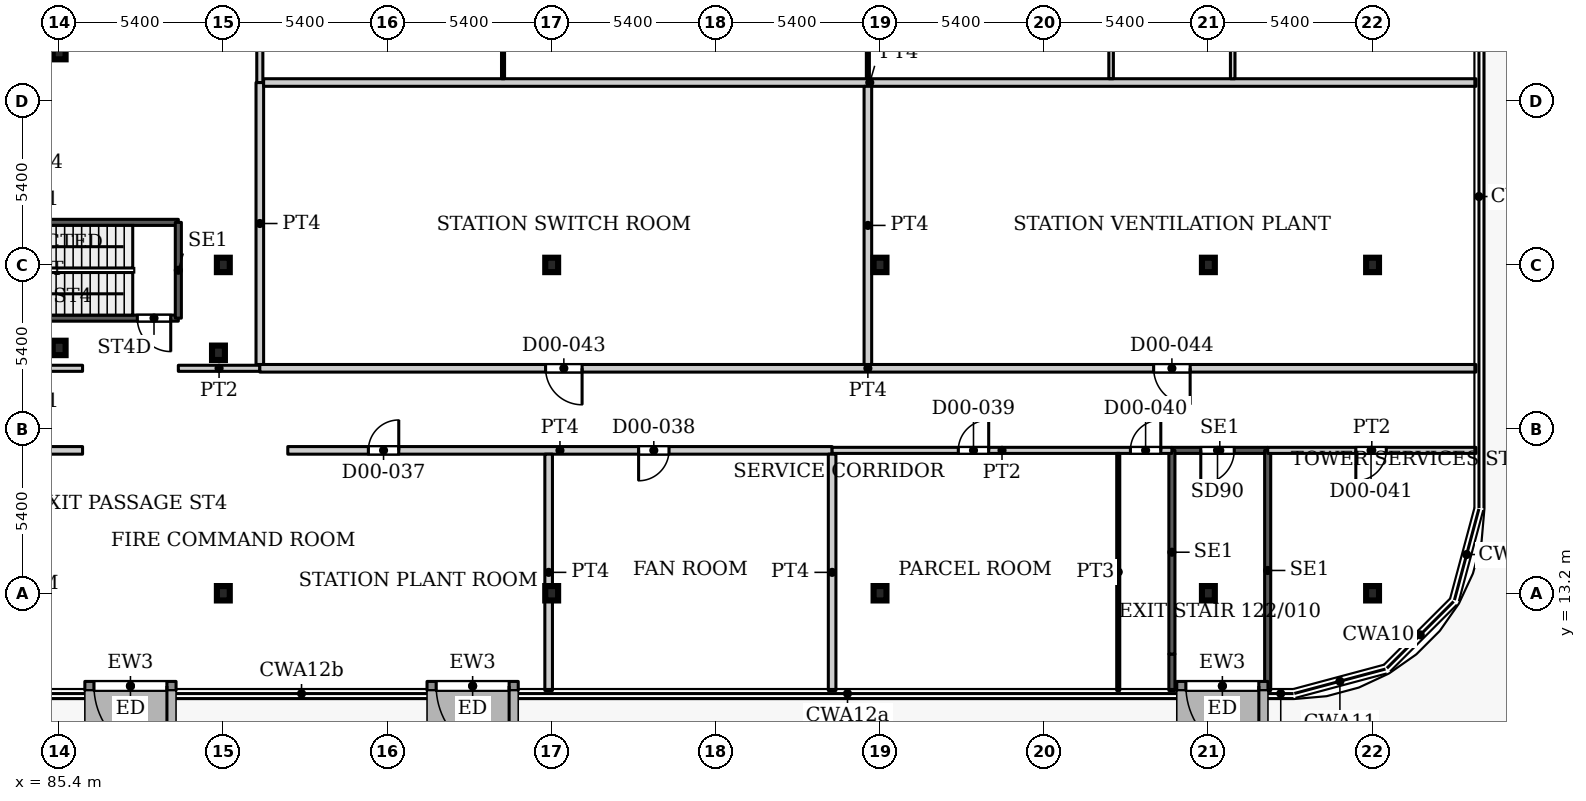
"""IFC4 building model, lengths in metres.
Left out: names, types, materials, properties, quantities, classifications, styles, units other than length and angle.
Written with IfcOpenShell. Run it as: python <this file> out.ifc"""

import sys

from ifc_helpers import new_model, si_unit, direction, frame, frame_2d, origin, origin_2d, place, context, subcontext, project, spatial, rectangle, i_section, extrude, source, transform, mapped, element, fill, save


model = new_model("IFC4")
c1 = context("Model", 3, precision=1e-05, world=origin(), true_north=direction((0.0, 1.0)))
c2 = subcontext(c1, "Body", "Model", "MODEL_VIEW")
j1 = project(units=[si_unit("LENGTHUNIT", "METRE"), si_unit("PLANEANGLEUNIT", "RADIAN")], contexts=[c1])
p1 = place(None, origin())
s1 = spatial("IfcSite", under=j1, at=p1, CompositionType="ELEMENT")
p2 = place(p1, origin())
s2 = spatial("IfcBuilding", under=s1, at=p2, CompositionType="ELEMENT")
p3 = place(p2, origin())
s3 = spatial("IfcBuildingStorey", under=s2, at=p3, CompositionType="ELEMENT", Elevation=0.0)
for number, where, z_axis, x_axis in (
    (1, (90.8, 13.2, 0.0), (0.0, 0.0, 1.0), (1.0, 0.0, 0.0)),
    (2, (101.6, 13.2, 0.0), (0.0, 0.0, 1.0), (1.0, 0.0, 0.0)),
    (3, (112.4, 13.2, 0.0), (0.0, 0.0, 1.0), (1.0, 0.0, 0.0)),
    (4, (123.2, 13.2, 0.0), (0.0, 0.0, 1.0), (1.0, 0.0, 0.0)),
    (5, (128.6, 13.2, 0.0), (0.0, 0.0, 1.0), (1.0, 0.0, 0.0)),
    (6, (90.8, 24.0, 0.0), (0.0, 0.0, 1.0), (1.0, 0.0, 0.0)),
    (7, (101.6, 24.0, 0.0), (0.0, 0.0, 1.0), (1.0, 0.0, 0.0)),
    (8, (112.4, 24.0, 0.0), (0.0, 0.0, 1.0), (1.0, 0.0, 0.0)),
    (9, (123.2, 24.0, 0.0), (0.0, 0.0, 1.0), (1.0, 0.0, 0.0)),
    (10, (128.6, 24.0, 0.0), (0.0, 0.0, 1.0), (1.0, 0.0, 0.0)),
    (11, (90.64, 21.11, 0.0), (0.0, 0.0, 1.0), (1.0, 0.0, 0.0)),
    (12, (85.4, 21.27, 0.0), (0.0, 0.0, 1.0), (1.0, 0.0, 0.0)),
    (13, (85.4, 31.0, 0.0), (0.0, 0.0, 1.0), (1.0, 0.0, 0.0)),
):
    element("IfcColumn", number, at=place(p3, frame(where, z_axis=z_axis, x_axis=x_axis)), inside=s3, PredefinedType="COLUMN", context=c2, shape_type="SweptSolid", body=[
        extrude(i_section(OverallWidth=0.424, OverallDepth=0.474, WebThickness=0.048, FlangeThickness=0.077, FilletRadius=0.014, at=origin_2d()), origin(), (0.0, 0.0, 1.0), 7.5),
    ])
p4 = place(p3, frame((125.16, 10.15, 0.0), z_axis=(0.0, 0.0, 1.0), x_axis=(-1.0, 0.0, 0.0)))
e14 = element("IfcWall", 14, at=p4, inside=s3, PredefinedType="SOLIDWALL", context=c2, shape_type="SweptSolid", body=[
    extrude(rectangle(XDim=3.0, YDim=0.3, at=frame_2d((1.5, 0.0))), origin(), (0.0, 0.0, 1.0), 7.25),
])
p5 = place(p4, frame((0.3, 0.0, 0.0)))
e15 = element("IfcOpeningElement", 15, at=p5, cuts=e14, PredefinedType="OPENING", context=c2, shape_type="SweptSolid", body=[
    extrude(rectangle(XDim=2.4, YDim=2.7, at=frame_2d((1.2, 1.35))), frame((0.0, 0.16, 0.0), z_axis=(0.0, -1.0, 0.0), x_axis=(1.0, 0.0, 0.0)), (0.0, 0.0, 1.0), 0.32),
])
p6 = place(p3, frame((100.5, 10.15, 0.0), z_axis=(0.0, 0.0, 1.0), x_axis=(-1.0, 0.0, 0.0)))
e16 = element("IfcWall", 16, at=p6, inside=s3, PredefinedType="SOLIDWALL", context=c2, shape_type="SweptSolid", body=[
    extrude(rectangle(XDim=3.0, YDim=0.3, at=frame_2d((1.5, 0.0))), origin(), (0.0, 0.0, 1.0), 7.25),
])
p7 = place(p6, frame((0.3, 0.0, 0.0)))
e17 = element("IfcOpeningElement", 17, at=p7, cuts=e16, PredefinedType="OPENING", context=c2, shape_type="SweptSolid", body=[
    extrude(rectangle(XDim=2.4, YDim=2.7, at=frame_2d((1.2, 1.35))), frame((0.0, 0.16, 0.0), z_axis=(0.0, -1.0, 0.0), x_axis=(1.0, 0.0, 0.0)), (0.0, 0.0, 1.0), 0.32),
])
p8 = place(p3, frame((89.245, 10.15, 0.0), z_axis=(0.0, 0.0, 1.0), x_axis=(-1.0, 0.0, 0.0)))
e18 = element("IfcWall", 18, at=p8, inside=s3, PredefinedType="SOLIDWALL", context=c2, shape_type="SweptSolid", body=[
    extrude(rectangle(XDim=3.0, YDim=0.3, at=frame_2d((1.5, 0.0))), origin(), (0.0, 0.0, 1.0), 7.25),
])
p9 = place(p8, frame((0.3, 0.0, 0.0)))
e19 = element("IfcOpeningElement", 19, at=p9, cuts=e18, PredefinedType="OPENING", context=c2, shape_type="SweptSolid", body=[
    extrude(rectangle(XDim=2.4, YDim=2.7, at=frame_2d((1.2, 1.35))), frame((0.0, 0.16, 0.0), z_axis=(0.0, -1.0, 0.0), x_axis=(1.0, 0.0, 0.0)), (0.0, 0.0, 1.0), 0.32),
])
p10 = place(p3, frame((80.16, 22.25, 0.0), z_axis=(0.0, 0.0, 1.0), x_axis=(1.0, 0.0, 0.0)))
e20 = element("IfcWall", 20, at=p10, inside=s3, PredefinedType="SHEAR", context=c2, shape_type="SweptSolid", body=[
    extrude(rectangle(XDim=9.16, YDim=0.2, at=frame_2d((4.58, 0.0))), origin(), (0.0, 0.0, 1.0), 7.5),
])
p11 = place(p10, frame((7.81, 0.0, 0.0)))
e21 = element("IfcOpeningElement", 21, at=p11, cuts=e20, PredefinedType="OPENING", context=c2, shape_type="SweptSolid", body=[
    extrude(rectangle(XDim=1.1, YDim=2.2, at=frame_2d((0.55, 1.1))), frame((0.0, 0.11, 0.0), z_axis=(0.0, -1.0, 0.0), x_axis=(1.0, 0.0, 0.0)), (0.0, 0.0, 1.0), 0.22),
])
p12 = place(p3, frame((80.16, 25.4, 0.0), z_axis=(0.0, 0.0, 1.0), x_axis=(1.0, 0.0, 0.0)))
e22 = element("IfcWall", 22, at=p12, inside=s3, PredefinedType="SHEAR", context=c2, shape_type="SweptSolid", body=[
    extrude(rectangle(XDim=9.16, YDim=0.2, at=frame_2d((4.58, 0.0))), origin(), (0.0, 0.0, 1.0), 7.5),
])
p13 = place(p3, frame((89.32, 22.25, 0.0), z_axis=(0.0, 0.0, 1.0), x_axis=(0.0, 1.0, 0.0)))
e23 = element("IfcWall", 23, at=p13, inside=s3, PredefinedType="SHEAR", context=c2, shape_type="SweptSolid", body=[
    extrude(rectangle(XDim=3.15, YDim=0.2, at=frame_2d((1.575, 0.0))), origin(), (0.0, 0.0, 1.0), 7.5),
])
p14 = place(p3, frame((122.0, 17.9, 0.0), z_axis=(0.0, 0.0, 1.0), x_axis=(1.0, 0.0, 0.0)))
e24 = element("IfcWall", 24, at=p14, inside=s3, PredefinedType="SHEAR", context=c2, shape_type="SweptSolid", body=[
    extrude(rectangle(XDim=3.15, YDim=0.2, at=frame_2d((1.575, 0.0))), origin(), (0.0, 0.0, 1.0), 7.5),
])
p15 = place(p14, frame((0.95, 0.0, 0.0)))
e25 = element("IfcOpeningElement", 25, at=p15, cuts=e24, PredefinedType="OPENING", context=c2, shape_type="SweptSolid", body=[
    extrude(rectangle(XDim=1.1, YDim=2.2, at=frame_2d((0.55, 1.1))), frame((0.0, 0.11, 0.0), z_axis=(0.0, -1.0, 0.0), x_axis=(1.0, 0.0, 0.0)), (0.0, 0.0, 1.0), 0.22),
])
p16 = place(p3, frame((122.0, 10.0, 0.0), z_axis=(0.0, 0.0, 1.0), x_axis=(0.0, 1.0, 0.0)))
e26 = element("IfcWall", 26, at=p16, inside=s3, PredefinedType="SHEAR", context=c2, shape_type="SweptSolid", body=[
    extrude(rectangle(XDim=1.2, YDim=0.2, at=frame_2d((0.6, 0.0))), origin(), (0.0, 0.0, 1.0), 7.5),
])
p17 = place(p3, frame((122.0, 11.2, 0.0), z_axis=(0.0, 0.0, 1.0), x_axis=(0.0, 1.0, 0.0)))
e27 = element("IfcWall", 27, at=p17, inside=s3, PredefinedType="SHEAR", context=c2, shape_type="SweptSolid", body=[
    extrude(rectangle(XDim=6.7, YDim=0.2, at=frame_2d((3.35, 0.0))), origin(), (0.0, 0.0, 1.0), 7.5),
])
p18 = place(p3, frame((125.15, 10.0, 0.0), z_axis=(0.0, 0.0, 1.0), x_axis=(0.0, 1.0, 0.0)))
e28 = element("IfcWall", 28, at=p18, inside=s3, PredefinedType="SHEAR", context=c2, shape_type="SweptSolid", body=[
    extrude(rectangle(XDim=7.9, YDim=0.2, at=frame_2d((3.95, 0.0))), origin(), (0.0, 0.0, 1.0), 7.5),
])
p19 = place(p3, frame((79.91, 17.9, 0.0), z_axis=(0.0, 0.0, 1.0), x_axis=(1.0, 0.0, 0.0)))
e29 = element("IfcWall", 29, at=p19, inside=s3, PredefinedType="PARTITIONING", context=c2, shape_type="SweptSolid", body=[
    extrude(rectangle(XDim=6.26, YDim=0.25, at=frame_2d((3.13, 0.0))), origin(), (0.0, 0.0, 1.0), 7.08),
])
p20 = place(p19, frame((2.65, 0.0, 0.0)))
e30 = element("IfcOpeningElement", 30, at=p20, cuts=e29, PredefinedType="OPENING", context=c2, shape_type="SweptSolid", body=[
    extrude(rectangle(XDim=1.0, YDim=2.1, at=frame_2d((0.5, 1.05))), frame((0.0, 0.135, 0.0), z_axis=(0.0, -1.0, 0.0), x_axis=(1.0, 0.0, 0.0)), (0.0, 0.0, 1.0), 0.27),
])
p21 = place(p3, frame((79.91, 20.6, 0.0), z_axis=(0.0, 0.0, 1.0), x_axis=(1.0, 0.0, 0.0)))
e31 = element("IfcWall", 31, at=p21, inside=s3, PredefinedType="PARTITIONING", context=c2, shape_type="SweptSolid", body=[
    extrude(rectangle(XDim=6.26, YDim=0.2, at=frame_2d((3.13, 0.0))), origin(), (0.0, 0.0, 1.0), 7.08),
])
p22 = place(p3, frame((89.32, 20.6, 0.0), z_axis=(0.0, 0.0, 1.0), x_axis=(1.0, 0.0, 0.0)))
e32 = element("IfcWall", 32, at=p22, inside=s3, PredefinedType="PARTITIONING", context=c2, shape_type="SweptSolid", body=[
    extrude(rectangle(XDim=2.68, YDim=0.2, at=frame_2d((1.34, 0.0))), origin(), (0.0, 0.0, 1.0), 7.08),
])
p23 = place(p3, frame((92.0, 20.6, 0.0), z_axis=(0.0, 0.0, 1.0), x_axis=(1.0, 0.0, 0.0)))
e33 = element("IfcWall", 33, at=p23, inside=s3, PredefinedType="PARTITIONING", context=c2, shape_type="SweptSolid", body=[
    extrude(rectangle(XDim=40.0, YDim=0.25, at=frame_2d((20.0, 0.0))), origin(), (0.0, 0.0, 1.0), 7.08),
])
p24 = place(p23, frame((9.4, 0.0, 0.0)))
e34 = element("IfcOpeningElement", 34, at=p24, cuts=e33, PredefinedType="OPENING", context=c2, shape_type="SweptSolid", body=[
    extrude(rectangle(XDim=1.2, YDim=2.1, at=frame_2d((0.6, 1.05))), frame((0.0, 0.135, 0.0), z_axis=(0.0, -1.0, 0.0), x_axis=(1.0, 0.0, 0.0)), (0.0, 0.0, 1.0), 0.27),
])
p25 = place(p23, frame((29.4, 0.0, 0.0)))
e35 = element("IfcOpeningElement", 35, at=p25, cuts=e33, PredefinedType="OPENING", context=c2, shape_type="SweptSolid", body=[
    extrude(rectangle(XDim=1.2, YDim=2.1, at=frame_2d((0.6, 1.05))), frame((0.0, 0.135, 0.0), z_axis=(0.0, -1.0, 0.0), x_axis=(1.0, 0.0, 0.0)), (0.0, 0.0, 1.0), 0.27),
])
p26 = place(p3, frame((92.0, 20.725, 0.0), z_axis=(0.0, 0.0, 1.0), x_axis=(0.0, 1.0, 0.0)))
e36 = element("IfcWall", 36, at=p26, inside=s3, PredefinedType="PARTITIONING", context=c2, shape_type="SweptSolid", body=[
    extrude(rectangle(XDim=9.275, YDim=0.25, at=frame_2d((4.637, 0.0))), origin(), (0.0, 0.0, 1.0), 7.08),
])
p27 = place(p3, frame((92.0, 30.0, 0.0), z_axis=(0.0, 0.0, 1.0), x_axis=(0.0, 1.0, 0.0)))
e37 = element("IfcWall", 37, at=p27, inside=s3, PredefinedType="PARTITIONING", context=c2, shape_type="SweptSolid", body=[
    extrude(rectangle(XDim=11.9, YDim=0.2, at=frame_2d((5.95, 0.0))), origin(), (0.0, 0.0, 1.0), 7.08),
])
p28 = place(p3, frame((92.125, 30.0, 0.0), z_axis=(0.0, 0.0, 1.0), x_axis=(1.0, 0.0, 0.0)))
e38 = element("IfcWall", 38, at=p28, inside=s3, PredefinedType="PARTITIONING", context=c2, shape_type="SweptSolid", body=[
    extrude(rectangle(XDim=39.875, YDim=0.25, at=frame_2d((19.938, 0.0))), origin(), (0.0, 0.0, 1.0), 7.08),
])
p29 = place(p3, frame((92.92, 17.9, 0.0), z_axis=(0.0, 0.0, 1.0), x_axis=(1.0, 0.0, 0.0)))
e39 = element("IfcWall", 39, at=p29, inside=s3, PredefinedType="PARTITIONING", context=c2, shape_type="SweptSolid", body=[
    extrude(rectangle(XDim=17.904, YDim=0.25, at=frame_2d((8.952, 0.0))), origin(), (0.0, 0.0, 1.0), 7.08),
])
p30 = place(p29, frame((2.65, 0.0, 0.0)))
e40 = element("IfcOpeningElement", 40, at=p30, cuts=e39, PredefinedType="OPENING", context=c2, shape_type="SweptSolid", body=[
    extrude(rectangle(XDim=1.0, YDim=2.1, at=frame_2d((0.5, 1.05))), frame((0.0, 0.135, 0.0), z_axis=(0.0, -1.0, 0.0), x_axis=(1.0, 0.0, 0.0)), (0.0, 0.0, 1.0), 0.27),
])
p31 = place(p29, frame((11.539, 0.0, 0.0)))
e41 = element("IfcOpeningElement", 41, at=p31, cuts=e39, PredefinedType="OPENING", context=c2, shape_type="SweptSolid", body=[
    extrude(rectangle(XDim=1.0, YDim=2.1, at=frame_2d((0.5, 1.05))), frame((0.0, 0.135, 0.0), z_axis=(0.0, -1.0, 0.0), x_axis=(1.0, 0.0, 0.0)), (0.0, 0.0, 1.0), 0.27),
])
p32 = place(p3, frame((100.0, 30.125, 0.0), z_axis=(0.0, 0.0, 1.0), x_axis=(0.0, 1.0, 0.0)))
e42 = element("IfcWall", 42, at=p32, inside=s3, PredefinedType="PARTITIONING", context=c2, shape_type="SweptSolid", body=[
    extrude(rectangle(XDim=11.775, YDim=0.1, at=frame_2d((5.887, 0.0))), origin(), (0.0, 0.0, 1.0), 7.08),
])
for number, where, z_axis, x_axis in (
    (43, (101.5, 10.0, 0.0), (0.0, 0.0, 1.0), (0.0, 1.0, 0.0)),
    (44, (110.824, 10.0, 0.0), (0.0, 0.0, 1.0), (0.0, 1.0, 0.0)),
):
    element("IfcWall", number, at=place(p3, frame(where, z_axis=z_axis, x_axis=x_axis)), inside=s3, PredefinedType="PARTITIONING", context=c2, shape_type="SweptSolid", body=[
        extrude(rectangle(XDim=7.775, YDim=0.25, at=frame_2d((3.887, 0.0))), origin(), (0.0, 0.0, 1.0), 7.08),
    ])
p33 = place(p3, frame((110.824, 17.9, 0.0), z_axis=(0.0, 0.0, 1.0), x_axis=(1.0, 0.0, 0.0)))
e45 = element("IfcWall", 45, at=p33, inside=s3, PredefinedType="PARTITIONING", context=c2, shape_type="SweptSolid", body=[
    extrude(rectangle(XDim=11.176, YDim=0.2, at=frame_2d((5.588, 0.0))), origin(), (0.0, 0.0, 1.0), 7.08),
])
p34 = place(p33, frame((4.15, 0.0, 0.0)))
e46 = element("IfcOpeningElement", 46, at=p34, cuts=e45, PredefinedType="OPENING", context=c2, shape_type="SweptSolid", body=[
    extrude(rectangle(XDim=1.0, YDim=2.1, at=frame_2d((0.5, 1.05))), frame((0.0, 0.11, 0.0), z_axis=(0.0, -1.0, 0.0), x_axis=(1.0, 0.0, 0.0)), (0.0, 0.0, 1.0), 0.22),
])
p35 = place(p33, frame((9.811, 0.0, 0.0)))
e47 = element("IfcOpeningElement", 47, at=p35, cuts=e45, PredefinedType="OPENING", context=c2, shape_type="SweptSolid", body=[
    extrude(rectangle(XDim=1.0, YDim=2.1, at=frame_2d((0.5, 1.05))), frame((0.0, 0.11, 0.0), z_axis=(0.0, -1.0, 0.0), x_axis=(1.0, 0.0, 0.0)), (0.0, 0.0, 1.0), 0.22),
])
p36 = place(p3, frame((112.0, 20.725, 0.0), z_axis=(0.0, 0.0, 1.0), x_axis=(0.0, 1.0, 0.0)))
e48 = element("IfcWall", 48, at=p36, inside=s3, PredefinedType="PARTITIONING", context=c2, shape_type="SweptSolid", body=[
    extrude(rectangle(XDim=9.15, YDim=0.25, at=frame_2d((4.575, 0.0))), origin(), (0.0, 0.0, 1.0), 7.08),
])
p37 = place(p3, frame((112.0, 30.125, 0.0), z_axis=(0.0, 0.0, 1.0), x_axis=(0.0, 1.0, 0.0)))
e49 = element("IfcWall", 49, at=p37, inside=s3, PredefinedType="PARTITIONING", context=c2, shape_type="SweptSolid", body=[
    extrude(rectangle(XDim=11.875, YDim=0.1, at=frame_2d((5.938, 0.0))), origin(), (0.0, 0.0, 1.0), 7.08),
])
p38 = place(p3, frame((120.0, 30.125, 0.0), z_axis=(0.0, 0.0, 1.0), x_axis=(0.0, 1.0, 0.0)))
e50 = element("IfcWall", 50, at=p38, inside=s3, PredefinedType="PARTITIONING", context=c2, shape_type="SweptSolid", body=[
    extrude(rectangle(XDim=11.8, YDim=0.15, at=frame_2d((5.9, 0.0))), origin(), (0.0, 0.0, 1.0), 7.08),
])
p39 = place(p3, frame((120.235, 10.0, 0.0), z_axis=(0.0, 0.0, 1.0), x_axis=(0.0, 1.0, 0.0)))
e51 = element("IfcWall", 51, at=p39, inside=s3, PredefinedType="PARTITIONING", context=c2, shape_type="SweptSolid", body=[
    extrude(rectangle(XDim=7.8, YDim=0.1, at=frame_2d((3.9, 0.0))), origin(), (0.0, 0.0, 1.0), 7.08),
])
p40 = place(p3, frame((124.0, 30.125, 0.0), z_axis=(0.0, 0.0, 1.0), x_axis=(0.0, 1.0, 0.0)))
e52 = element("IfcWall", 52, at=p40, inside=s3, PredefinedType="PARTITIONING", context=c2, shape_type="SweptSolid", body=[
    extrude(rectangle(XDim=13.776, YDim=0.15, at=frame_2d((6.888, 0.0))), origin(), (0.0, 0.0, 1.0), 7.08),
])
p41 = place(p40, frame((12.275, 0.0, 0.0)))
e53 = element("IfcOpeningElement", 53, at=p41, cuts=e52, PredefinedType="OPENING", context=c2, shape_type="SweptSolid", body=[
    extrude(rectangle(XDim=1.0, YDim=2.1, at=frame_2d((0.5, 1.05))), frame((0.0, 0.085, 0.0), z_axis=(0.0, -1.0, 0.0), x_axis=(1.0, 0.0, 0.0)), (0.0, 0.0, 1.0), 0.17),
])
p42 = place(p3, frame((125.15, 17.9, 0.0), z_axis=(0.0, 0.0, 1.0), x_axis=(1.0, 0.0, 0.0)))
e54 = element("IfcWall", 54, at=p42, inside=s3, PredefinedType="PARTITIONING", context=c2, shape_type="SweptSolid", body=[
    extrude(rectangle(XDim=6.85, YDim=0.2, at=frame_2d((3.425, 0.0))), origin(), (0.0, 0.0, 1.0), 7.08),
])
p43 = place(p42, frame((2.9, 0.0, 0.0)))
e55 = element("IfcOpeningElement", 55, at=p43, cuts=e54, PredefinedType="OPENING", context=c2, shape_type="SweptSolid", body=[
    extrude(rectangle(XDim=1.0, YDim=2.1, at=frame_2d((0.5, 1.05))), frame((0.0, 0.11, 0.0), z_axis=(0.0, -1.0, 0.0), x_axis=(1.0, 0.0, 0.0)), (0.0, 0.0, 1.0), 0.22),
])
m1 = source(origin(), c2, "Body", "SweptSolid", [
    extrude(rectangle(XDim=2.4, YDim=2.7, at=frame_2d((1.2, 1.35))), frame((0.0, 0.025, 0.0), z_axis=(0.0, -1.0, 0.0), x_axis=(1.0, 0.0, 0.0)), (0.0, 0.0, 1.0), 0.05),
])
p44 = place(p5, origin())
e56 = element("IfcDoor", 56, at=p44, inside=s3, OperationType="DOUBLE_DOOR_SINGLE_SWING", PredefinedType="DOOR", context=c2, shape_type="MappedRepresentation", body=[
    mapped(m1, transform((0.0, 0.0, 0.0), x_axis=(1.0, 0.0, 0.0), y_axis=(0.0, 1.0, 0.0), z_axis=(0.0, 0.0, 1.0), scale=1.0)),
])
fill(e15, e56)
p45 = place(p7, origin())
e57 = element("IfcDoor", 57, at=p45, inside=s3, OperationType="DOUBLE_DOOR_SINGLE_SWING", PredefinedType="DOOR", context=c2, shape_type="MappedRepresentation", body=[
    mapped(m1, transform((0.0, 0.0, 0.0), x_axis=(1.0, 0.0, 0.0), y_axis=(0.0, 1.0, 0.0), z_axis=(0.0, 0.0, 1.0), scale=1.0)),
])
fill(e17, e57)
p46 = place(p9, origin())
e58 = element("IfcDoor", 58, at=p46, inside=s3, OperationType="DOUBLE_DOOR_SINGLE_SWING", PredefinedType="DOOR", context=c2, shape_type="MappedRepresentation", body=[
    mapped(m1, transform((0.0, 0.0, 0.0), x_axis=(1.0, 0.0, 0.0), y_axis=(0.0, 1.0, 0.0), z_axis=(0.0, 0.0, 1.0), scale=1.0)),
])
fill(e19, e58)
m2 = source(origin(), c2, "Body", "SweptSolid", [
    extrude(rectangle(XDim=1.1, YDim=2.2, at=frame_2d((0.55, 1.1))), frame((0.0, 0.025, 0.0), z_axis=(0.0, -1.0, 0.0), x_axis=(1.0, 0.0, 0.0)), (0.0, 0.0, 1.0), 0.05),
])
p47 = place(p15, origin())
e59 = element("IfcDoor", 59, at=p47, inside=s3, OperationType="SINGLE_SWING_RIGHT", PredefinedType="DOOR", context=c2, shape_type="MappedRepresentation", body=[
    mapped(m2, transform((0.0, 0.0, 0.0), x_axis=(1.0, 0.0, 0.0), y_axis=(0.0, 1.0, 0.0), z_axis=(0.0, 0.0, 1.0), scale=1.0)),
])
fill(e25, e59)
p48 = place(p11, origin())
e60 = element("IfcDoor", 60, at=p48, inside=s3, OperationType="SINGLE_SWING_RIGHT", PredefinedType="DOOR", context=c2, shape_type="MappedRepresentation", body=[
    mapped(m2, transform((0.0, 0.0, 0.0), x_axis=(1.0, 0.0, 0.0), y_axis=(0.0, 1.0, 0.0), z_axis=(0.0, 0.0, 1.0), scale=1.0)),
])
fill(e21, e60)
m3 = source(origin(), c2, "Body", "SweptSolid", [
    extrude(rectangle(XDim=1.0, YDim=2.1, at=frame_2d((0.5, 1.05))), frame((0.0, 0.025, 0.0), z_axis=(0.0, -1.0, 0.0), x_axis=(1.0, 0.0, 0.0)), (0.0, 0.0, 1.0), 0.05),
])
p49 = place(p30, origin())
e61 = element("IfcDoor", 61, at=p49, inside=s3, OperationType="SINGLE_SWING_LEFT", PredefinedType="DOOR", context=c2, shape_type="MappedRepresentation", body=[
    mapped(m3, transform((0.0, 0.0, 0.0), x_axis=(1.0, 0.0, 0.0), y_axis=(0.0, 1.0, 0.0), z_axis=(0.0, 0.0, 1.0), scale=1.0)),
])
fill(e40, e61)
p50 = place(p31, origin())
e62 = element("IfcDoor", 62, at=p50, inside=s3, OperationType="SINGLE_SWING_RIGHT", PredefinedType="DOOR", context=c2, shape_type="MappedRepresentation", body=[
    mapped(m3, transform((0.0, 0.0, 0.0), x_axis=(1.0, 0.0, 0.0), y_axis=(0.0, 1.0, 0.0), z_axis=(0.0, 0.0, 1.0), scale=1.0)),
])
fill(e41, e62)
m4 = source(origin(), c2, "Body", "SweptSolid", [
    extrude(rectangle(XDim=1.0, YDim=2.1, at=frame_2d((0.5, 1.05))), frame((0.0, 0.025, 0.0), z_axis=(0.0, -1.0, 0.0), x_axis=(1.0, 0.0, 0.0)), (0.0, 0.0, 1.0), 0.05),
])
p51 = place(p34, origin())
e63 = element("IfcDoor", 63, at=p51, inside=s3, OperationType="SINGLE_SWING_LEFT", PredefinedType="DOOR", context=c2, shape_type="MappedRepresentation", body=[
    mapped(m4, transform((0.0, 0.0, 0.0), x_axis=(1.0, 0.0, 0.0), y_axis=(0.0, 1.0, 0.0), z_axis=(0.0, 0.0, 1.0), scale=1.0)),
])
fill(e46, e63)
p52 = place(p35, origin())
e64 = element("IfcDoor", 64, at=p52, inside=s3, OperationType="SINGLE_SWING_LEFT", PredefinedType="DOOR", context=c2, shape_type="MappedRepresentation", body=[
    mapped(m4, transform((0.0, 0.0, 0.0), x_axis=(1.0, 0.0, 0.0), y_axis=(0.0, 1.0, 0.0), z_axis=(0.0, 0.0, 1.0), scale=1.0)),
])
fill(e47, e64)
p53 = place(p43, origin())
e65 = element("IfcDoor", 65, at=p53, inside=s3, OperationType="SINGLE_SWING_RIGHT", PredefinedType="DOOR", context=c2, shape_type="MappedRepresentation", body=[
    mapped(m4, transform((0.0, 0.0, 0.0), x_axis=(1.0, 0.0, 0.0), y_axis=(0.0, 1.0, 0.0), z_axis=(0.0, 0.0, 1.0), scale=1.0)),
])
fill(e55, e65)
m5 = source(origin(), c2, "Body", "SweptSolid", [
    extrude(rectangle(XDim=1.2, YDim=2.1, at=frame_2d((0.6, 1.05))), frame((0.0, 0.025, 0.0), z_axis=(0.0, -1.0, 0.0), x_axis=(1.0, 0.0, 0.0)), (0.0, 0.0, 1.0), 0.05),
])
p54 = place(p24, origin())
e66 = element("IfcDoor", 66, at=p54, inside=s3, OperationType="SINGLE_SWING_RIGHT", PredefinedType="DOOR", context=c2, shape_type="MappedRepresentation", body=[
    mapped(m5, transform((0.0, 0.0, 0.0), x_axis=(1.0, 0.0, 0.0), y_axis=(0.0, 1.0, 0.0), z_axis=(0.0, 0.0, 1.0), scale=1.0)),
])
fill(e34, e66)
p55 = place(p25, origin())
e67 = element("IfcDoor", 67, at=p55, inside=s3, OperationType="SINGLE_SWING_RIGHT", PredefinedType="DOOR", context=c2, shape_type="MappedRepresentation", body=[
    mapped(m5, transform((0.0, 0.0, 0.0), x_axis=(1.0, 0.0, 0.0), y_axis=(0.0, 1.0, 0.0), z_axis=(0.0, 0.0, 1.0), scale=1.0)),
])
fill(e35, e67)
save(model, sys.argv[1])
